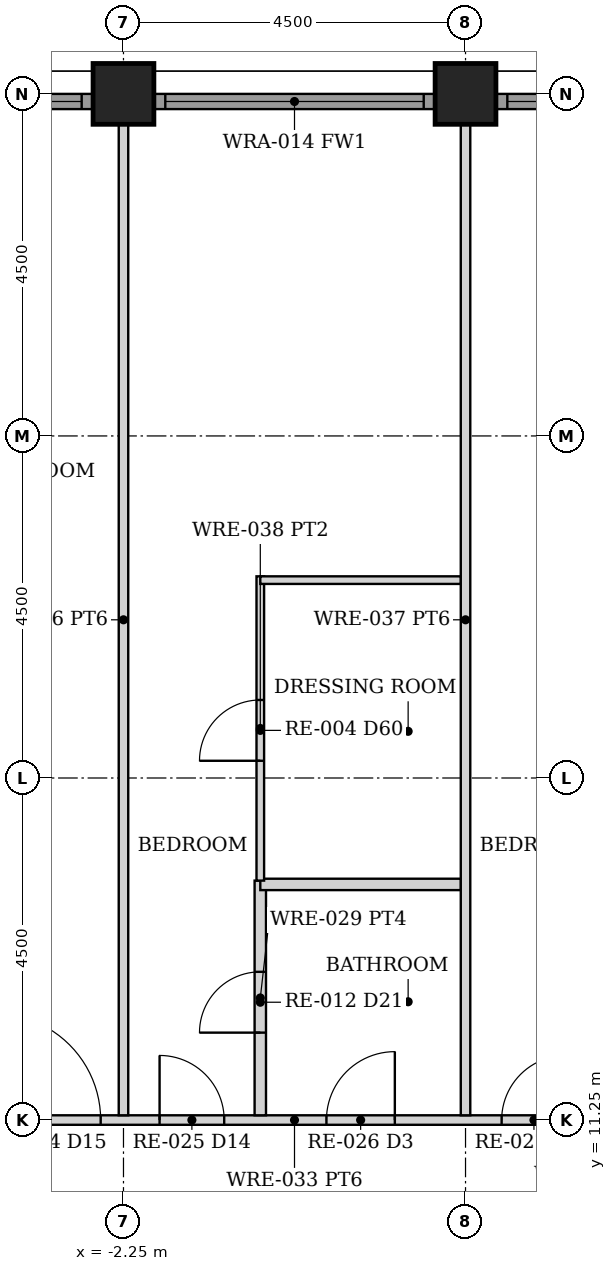
"""IFC4 building model, lengths in metres.
Left out: names, types, materials, properties, quantities, classifications, styles, units other than length and angle.
Written with IfcOpenShell. Run it as: python <this file> out.ifc"""

import sys

from ifc_helpers import new_model, si_unit, direction, frame, frame_2d, origin, origin_2d, place, context, subcontext, project, spatial, rectangle, hollow_rectangle, extrude, element, fill, save


model = new_model("IFC4")
c1 = context("Model", 3, precision=1e-05, world=origin(), true_north=direction((0.0, 1.0)))
c2 = subcontext(c1, "Body", "Model", "MODEL_VIEW")
j1 = project(units=[si_unit("LENGTHUNIT", "METRE"), si_unit("PLANEANGLEUNIT", "RADIAN")], contexts=[c1])
p1 = place(None, origin())
s1 = spatial("IfcSite", under=j1, at=p1, CompositionType="ELEMENT")
p2 = place(p1, origin())
s2 = spatial("IfcBuilding", under=s1, at=p2, CompositionType="ELEMENT")
p3 = place(p2, frame((0.0, 0.0, 68.5)))
s3 = spatial("IfcBuildingStorey", under=s2, at=p3, CompositionType="ELEMENT", Elevation=68.5)
for number, where, z_axis, x_axis in (
    (1, (-2.25, 24.75, 0.0), (0.0, 0.0, 1.0), (0.0, 1.0, 0.0)),
    (2, (2.25, 24.75, 0.0), (0.0, 0.0, 1.0), (0.0, 1.0, 0.0)),
):
    element("IfcColumn", number, at=place(p3, frame(where, z_axis=z_axis, x_axis=x_axis)), inside=s3, PredefinedType="COLUMN", context=c2, shape_type="SweptSolid", body=[
        extrude(hollow_rectangle(XDim=0.8, YDim=0.8, WallThickness=0.06, at=origin_2d()), origin(), (0.0, 0.0, 1.0), 3.5),
    ])
p4 = place(p3, frame((-6.345, 24.65, 0.0), z_axis=(0.0, 0.0, 1.0), x_axis=(1.0, 0.0, 0.0)))
e3 = element("IfcWall", 3, at=p4, inside=s3, PredefinedType="SOLIDWALL", context=c2, shape_type="SweptSolid", body=[
    extrude(rectangle(XDim=3.69, YDim=0.2, at=frame_2d((1.845, 0.0))), origin(), (0.0, 0.0, 1.0), 2.379),
])
p5 = place(p4, frame((0.145, 0.0, 0.3)))
e4 = element("IfcOpeningElement", 4, at=p5, cuts=e3, PredefinedType="OPENING", context=c2, shape_type="SweptSolid", body=[
    extrude(rectangle(XDim=3.4, YDim=1.929, at=frame_2d((1.7, 0.964))), frame((0.0, 0.11, 0.0), z_axis=(0.0, -1.0, 0.0), x_axis=(1.0, 0.0, 0.0)), (0.0, 0.0, 1.0), 0.22),
])
p6 = place(p3, frame((-1.845, 24.65, 0.0), z_axis=(0.0, 0.0, 1.0), x_axis=(1.0, 0.0, 0.0)))
e5 = element("IfcWall", 5, at=p6, inside=s3, PredefinedType="SOLIDWALL", context=c2, shape_type="SweptSolid", body=[
    extrude(rectangle(XDim=3.69, YDim=0.2, at=frame_2d((1.845, 0.0))), origin(), (0.0, 0.0, 1.0), 2.379),
])
p7 = place(p6, frame((0.145, 0.0, 0.3)))
e6 = element("IfcOpeningElement", 6, at=p7, cuts=e5, PredefinedType="OPENING", context=c2, shape_type="SweptSolid", body=[
    extrude(rectangle(XDim=3.4, YDim=1.929, at=frame_2d((1.7, 0.964))), frame((0.0, 0.11, 0.0), z_axis=(0.0, -1.0, 0.0), x_axis=(1.0, 0.0, 0.0)), (0.0, 0.0, 1.0), 0.22),
])
p8 = place(p3, frame((2.655, 24.65, 0.0), z_axis=(0.0, 0.0, 1.0), x_axis=(1.0, 0.0, 0.0)))
e7 = element("IfcWall", 7, at=p8, inside=s3, PredefinedType="SOLIDWALL", context=c2, shape_type="SweptSolid", body=[
    extrude(rectangle(XDim=3.69, YDim=0.2, at=frame_2d((1.845, 0.0))), origin(), (0.0, 0.0, 1.0), 2.379),
])
p9 = place(p8, frame((0.145, 0.0, 0.3)))
e8 = element("IfcOpeningElement", 8, at=p9, cuts=e7, PredefinedType="OPENING", context=c2, shape_type="SweptSolid", body=[
    extrude(rectangle(XDim=3.4, YDim=1.929, at=frame_2d((1.7, 0.964))), frame((0.0, 0.11, 0.0), z_axis=(0.0, -1.0, 0.0), x_axis=(1.0, 0.0, 0.0)), (0.0, 0.0, 1.0), 0.22),
])
p10 = place(p3, frame((-6.65, 11.25, 0.0), z_axis=(0.0, 0.0, 1.0), x_axis=(1.0, 0.0, 0.0)))
e9 = element("IfcWall", 9, at=p10, inside=s3, PredefinedType="PARTITIONING", context=c2, shape_type="SweptSolid", body=[
    extrude(rectangle(XDim=13.3, YDim=0.125, at=frame_2d((6.65, 0.0))), origin(), (0.0, 0.0, 1.0), 2.373),
])
p11 = place(p10, frame((0.7, 0.0, 0.0)))
e10 = element("IfcOpeningElement", 10, at=p11, cuts=e9, PredefinedType="OPENING", context=c2, shape_type="SweptSolid", body=[
    extrude(rectangle(XDim=0.9, YDim=2.1, at=frame_2d((0.45, 1.05))), frame((0.0, 0.073, 0.0), z_axis=(0.0, -1.0, 0.0), x_axis=(1.0, 0.0, 0.0)), (0.0, 0.0, 1.0), 0.145),
])
p12 = place(p10, frame((2.7, 0.0, 0.0)))
e11 = element("IfcOpeningElement", 11, at=p12, cuts=e9, PredefinedType="OPENING", context=c2, shape_type="SweptSolid", body=[
    extrude(rectangle(XDim=1.4, YDim=2.1, at=frame_2d((0.7, 1.05))), frame((0.0, 0.073, 0.0), z_axis=(0.0, -1.0, 0.0), x_axis=(1.0, 0.0, 0.0)), (0.0, 0.0, 1.0), 0.145),
])
p13 = place(p10, frame((4.875, 0.0, 0.0)))
e12 = element("IfcOpeningElement", 12, at=p13, cuts=e9, PredefinedType="OPENING", context=c2, shape_type="SweptSolid", body=[
    extrude(rectangle(XDim=0.85, YDim=2.1, at=frame_2d((0.425, 1.05))), frame((0.0, 0.073, 0.0), z_axis=(0.0, -1.0, 0.0), x_axis=(1.0, 0.0, 0.0)), (0.0, 0.0, 1.0), 0.145),
])
p14 = place(p10, frame((7.07, 0.0, 0.0)))
e13 = element("IfcOpeningElement", 13, at=p14, cuts=e9, PredefinedType="OPENING", context=c2, shape_type="SweptSolid", body=[
    extrude(rectangle(XDim=0.9, YDim=2.1, at=frame_2d((0.45, 1.05))), frame((0.0, 0.073, 0.0), z_axis=(0.0, -1.0, 0.0), x_axis=(1.0, 0.0, 0.0)), (0.0, 0.0, 1.0), 0.145),
])
p15 = place(p10, frame((9.375, 0.0, 0.0)))
e14 = element("IfcOpeningElement", 14, at=p15, cuts=e9, PredefinedType="OPENING", context=c2, shape_type="SweptSolid", body=[
    extrude(rectangle(XDim=0.85, YDim=2.1, at=frame_2d((0.425, 1.05))), frame((0.0, 0.073, 0.0), z_axis=(0.0, -1.0, 0.0), x_axis=(1.0, 0.0, 0.0)), (0.0, 0.0, 1.0), 0.145),
])
p16 = place(p3, frame((-2.25, 11.312, 0.0), z_axis=(0.0, 0.0, 1.0), x_axis=(0.0, 1.0, 0.0)))
e15 = element("IfcWall", 15, at=p16, inside=s3, PredefinedType="PARTITIONING", context=c2, shape_type="SweptSolid", body=[
    extrude(rectangle(XDim=13.038, YDim=0.125, at=frame_2d((6.519, 0.0))), origin(), (0.0, 0.0, 1.0), 2.373),
])
p17 = place(p3, frame((-0.45, 11.312, 0.0), z_axis=(0.0, 0.0, 1.0), x_axis=(0.0, 1.0, 0.0)))
e16 = element("IfcWall", 16, at=p17, inside=s3, PredefinedType="PARTITIONING", context=c2, shape_type="SweptSolid", body=[
    extrude(rectangle(XDim=3.087, YDim=0.15, at=frame_2d((1.544, 0.0))), origin(), (0.0, 0.0, 1.0), 2.373),
])
p18 = place(p17, frame((1.087, 0.0, 0.0)))
e17 = element("IfcOpeningElement", 17, at=p18, cuts=e16, PredefinedType="OPENING", context=c2, shape_type="SweptSolid", body=[
    extrude(rectangle(XDim=0.8, YDim=2.1, at=frame_2d((0.4, 1.05))), frame((0.0, 0.085, 0.0), z_axis=(0.0, -1.0, 0.0), x_axis=(1.0, 0.0, 0.0)), (0.0, 0.0, 1.0), 0.17),
])
p19 = place(p3, frame((-0.45, 14.35, 0.0), z_axis=(0.0, 0.0, 1.0), x_axis=(1.0, 0.0, 0.0)))
e18 = element("IfcWall", 18, at=p19, inside=s3, PredefinedType="PARTITIONING", context=c2, shape_type="SweptSolid", body=[
    extrude(rectangle(XDim=2.64, YDim=0.15, at=frame_2d((1.32, 0.0))), origin(), (0.0, 0.0, 1.0), 2.373),
])
p20 = place(p3, frame((-0.45, 14.4, 0.0), z_axis=(0.0, 0.0, 1.0), x_axis=(0.0, 1.0, 0.0)))
e19 = element("IfcWall", 19, at=p20, inside=s3, PredefinedType="PARTITIONING", context=c2, shape_type="SweptSolid", body=[
    extrude(rectangle(XDim=4.003, YDim=0.1, at=frame_2d((2.001, 0.0))), origin(), (0.0, 0.0, 1.0), 2.373),
])
p21 = place(p20, frame((1.576, 0.0, 0.0)))
e20 = element("IfcOpeningElement", 20, at=p21, cuts=e19, PredefinedType="OPENING", context=c2, shape_type="SweptSolid", body=[
    extrude(rectangle(XDim=0.8, YDim=2.1, at=frame_2d((0.4, 1.05))), frame((0.0, 0.06, 0.0), z_axis=(0.0, -1.0, 0.0), x_axis=(1.0, 0.0, 0.0)), (0.0, 0.0, 1.0), 0.12),
])
p22 = place(p3, frame((-0.45, 18.353, 0.0), z_axis=(0.0, 0.0, 1.0), x_axis=(1.0, 0.0, 0.0)))
e21 = element("IfcWall", 21, at=p22, inside=s3, PredefinedType="PARTITIONING", context=c2, shape_type="SweptSolid", body=[
    extrude(rectangle(XDim=2.64, YDim=0.1, at=frame_2d((1.32, 0.0))), origin(), (0.0, 0.0, 1.0), 2.373),
])
p23 = place(p3, frame((2.25, 11.312, 0.0), z_axis=(0.0, 0.0, 1.0), x_axis=(0.0, 1.0, 0.0)))
e22 = element("IfcWall", 22, at=p23, inside=s3, PredefinedType="PARTITIONING", context=c2, shape_type="SweptSolid", body=[
    extrude(rectangle(XDim=13.038, YDim=0.125, at=frame_2d((6.519, 0.0))), origin(), (0.0, 0.0, 1.0), 2.373),
])
p24 = place(p5, origin())
e23 = element("IfcWindow", 23, at=p24, inside=s3, PartitioningType="SINGLE_PANEL", PredefinedType="WINDOW", context=c2, shape_type="SweptSolid", body=[
    extrude(rectangle(XDim=3.4, YDim=1.929, at=frame_2d((1.7, 0.964))), frame((0.0, 0.03, 0.0), z_axis=(0.0, -1.0, 0.0), x_axis=(1.0, 0.0, 0.0)), (0.0, 0.0, 1.0), 0.06),
])
fill(e4, e23)
p25 = place(p7, origin())
e24 = element("IfcWindow", 24, at=p25, inside=s3, PartitioningType="SINGLE_PANEL", PredefinedType="WINDOW", context=c2, shape_type="SweptSolid", body=[
    extrude(rectangle(XDim=3.4, YDim=1.929, at=frame_2d((1.7, 0.964))), frame((0.0, 0.03, 0.0), z_axis=(0.0, -1.0, 0.0), x_axis=(1.0, 0.0, 0.0)), (0.0, 0.0, 1.0), 0.06),
])
fill(e6, e24)
p26 = place(p9, origin())
e25 = element("IfcWindow", 25, at=p26, inside=s3, PartitioningType="SINGLE_PANEL", PredefinedType="WINDOW", context=c2, shape_type="SweptSolid", body=[
    extrude(rectangle(XDim=3.4, YDim=1.929, at=frame_2d((1.7, 0.964))), frame((0.0, 0.03, 0.0), z_axis=(0.0, -1.0, 0.0), x_axis=(1.0, 0.0, 0.0)), (0.0, 0.0, 1.0), 0.06),
])
fill(e8, e25)
p27 = place(p12, origin())
e26 = element("IfcDoor", 26, at=p27, inside=s3, OperationType="SINGLE_SWING_LEFT", PredefinedType="DOOR", context=c2, shape_type="SweptSolid", body=[
    extrude(rectangle(XDim=1.4, YDim=2.1, at=frame_2d((0.7, 1.05))), frame((0.0, 0.025, 0.0), z_axis=(0.0, -1.0, 0.0), x_axis=(1.0, 0.0, 0.0)), (0.0, 0.0, 1.0), 0.05),
])
fill(e11, e26)
p28 = place(p13, origin())
e27 = element("IfcDoor", 27, at=p28, inside=s3, OperationType="SINGLE_SWING_LEFT", PredefinedType="DOOR", context=c2, shape_type="SweptSolid", body=[
    extrude(rectangle(XDim=0.85, YDim=2.1, at=frame_2d((0.425, 1.05))), frame((0.0, 0.025, 0.0), z_axis=(0.0, -1.0, 0.0), x_axis=(1.0, 0.0, 0.0)), (0.0, 0.0, 1.0), 0.05),
])
fill(e12, e27)
p29 = place(p18, origin())
e28 = element("IfcDoor", 28, at=p29, inside=s3, OperationType="SINGLE_SWING_LEFT", PredefinedType="DOOR", context=c2, shape_type="SweptSolid", body=[
    extrude(rectangle(XDim=0.8, YDim=2.1, at=frame_2d((0.4, 1.05))), frame((0.0, 0.025, 0.0), z_axis=(0.0, -1.0, 0.0), x_axis=(1.0, 0.0, 0.0)), (0.0, 0.0, 1.0), 0.05),
])
fill(e17, e28)
p30 = place(p14, origin())
e29 = element("IfcDoor", 29, at=p30, inside=s3, OperationType="SINGLE_SWING_RIGHT", PredefinedType="DOOR", context=c2, shape_type="SweptSolid", body=[
    extrude(rectangle(XDim=0.9, YDim=2.1, at=frame_2d((0.45, 1.05))), frame((0.0, 0.025, 0.0), z_axis=(0.0, -1.0, 0.0), x_axis=(1.0, 0.0, 0.0)), (0.0, 0.0, 1.0), 0.05),
])
fill(e13, e29)
p31 = place(p21, origin())
e30 = element("IfcDoor", 30, at=p31, inside=s3, OperationType="SINGLE_SWING_LEFT", PredefinedType="DOOR", context=c2, shape_type="SweptSolid", body=[
    extrude(rectangle(XDim=0.8, YDim=2.1, at=frame_2d((0.4, 1.05))), frame((0.0, 0.025, 0.0), z_axis=(0.0, -1.0, 0.0), x_axis=(1.0, 0.0, 0.0)), (0.0, 0.0, 1.0), 0.05),
])
fill(e20, e30)
p32 = place(p15, origin())
e31 = element("IfcDoor", 31, at=p32, inside=s3, OperationType="SINGLE_SWING_RIGHT", PredefinedType="DOOR", context=c2, shape_type="SweptSolid", body=[
    extrude(rectangle(XDim=0.85, YDim=2.1, at=frame_2d((0.425, 1.05))), frame((0.0, 0.025, 0.0), z_axis=(0.0, -1.0, 0.0), x_axis=(1.0, 0.0, 0.0)), (0.0, 0.0, 1.0), 0.05),
])
fill(e14, e31)
save(model, sys.argv[1])
